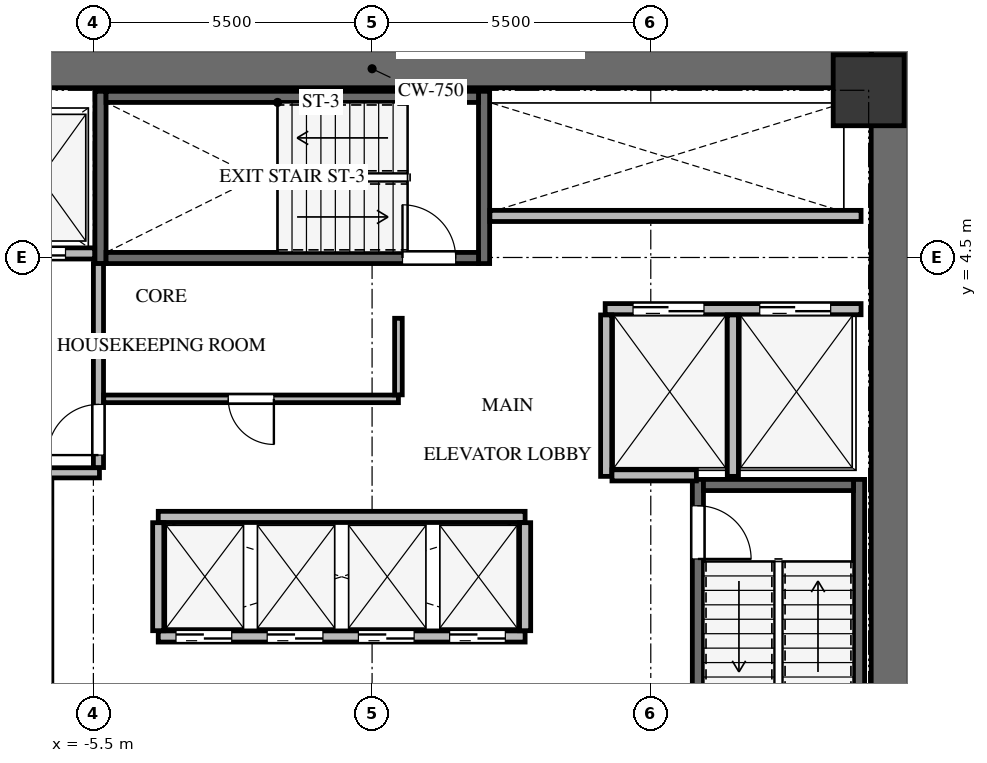
"""IFC4 building model, lengths in metres.
Left out: names, types, materials, properties, quantities, classifications, styles, units other than length and angle.
Written with IfcOpenShell. Run it as: python <this file> out.ifc"""

import sys

from ifc_helpers import new_model, si_unit, direction, frame, frame_2d, origin, origin_2d, place, context, subcontext, project, spatial, rectangle, extrude, source, transform, mapped, element, fill, save


model = new_model("IFC4")
c1 = context("Model", 3, precision=1e-05, world=origin(), true_north=direction((0.0, 1.0)))
c2 = subcontext(c1, "Body", "Model", "MODEL_VIEW")
j1 = project(units=[si_unit("LENGTHUNIT", "METRE"), si_unit("PLANEANGLEUNIT", "RADIAN")], contexts=[c1])
p1 = place(None, origin())
s1 = spatial("IfcSite", under=j1, at=p1, CompositionType="ELEMENT")
p2 = place(p1, origin())
s2 = spatial("IfcBuilding", under=s1, at=p2, CompositionType="ELEMENT")
p3 = place(p2, frame((0.0, 0.0, 114.0)))
s3 = spatial("IfcBuildingStorey", under=s2, at=p3, CompositionType="ELEMENT", Elevation=114.0)
p4 = place(p3, frame((10.225, -8.6, 0.0), z_axis=(0.0, 0.0, 1.0), x_axis=(0.0, 1.0, 0.0)))
e1 = element("IfcWall", 1, at=p4, inside=s3, PredefinedType="SHEAR", context=c2, shape_type="SweptSolid", body=[
    extrude(rectangle(XDim=17.2, YDim=0.75, at=frame_2d((8.6, 0.0))), origin(), (0.0, 0.0, 1.0), 3.3),
])
p5 = place(p3, frame((-9.85, 8.225, 0.0), z_axis=(0.0, 0.0, 1.0), x_axis=(1.0, 0.0, 0.0)))
e2 = element("IfcWall", 2, at=p5, inside=s3, PredefinedType="SHEAR", context=c2, shape_type="SweptSolid", body=[
    extrude(rectangle(XDim=19.7, YDim=0.75, at=frame_2d((9.85, 0.0))), origin(), (0.0, 0.0, 1.0), 3.3),
])
p6 = place(p3, frame((-6.43, -7.77, -0.24), z_axis=(0.0, 0.0, 1.0), x_axis=(0.0, 1.0, 0.0)))
e3 = element("IfcWall", 3, at=p6, inside=s3, PredefinedType="SHEAR", context=c2, shape_type="SweptSolid", body=[
    extrude(rectangle(XDim=7.89, YDim=0.22, at=frame_2d((3.945, 0.0))), origin(), (0.0, 0.0, 1.0), 3.3),
])
p7 = place(p6, frame((6.32, 0.0, 0.0)))
e4 = element("IfcOpeningElement", 4, at=p7, cuts=e3, PredefinedType="OPENING", context=c2, shape_type="SweptSolid", body=[
    extrude(rectangle(XDim=1.05, YDim=2.15, at=frame_2d((0.525, 1.075))), frame((0.0, 0.12, 0.0), z_axis=(0.0, -1.0, 0.0), x_axis=(1.0, 0.0, 0.0)), (0.0, 0.0, 1.0), 0.24),
])
p8 = place(p3, frame((9.61, -7.77, -0.24), z_axis=(0.0, 0.0, 1.0), x_axis=(0.0, 1.0, 0.0)))
e5 = element("IfcWall", 5, at=p8, inside=s3, PredefinedType="SHEAR", context=c2, shape_type="SweptSolid", body=[
    extrude(rectangle(XDim=7.89, YDim=0.22, at=frame_2d((3.945, 0.0))), origin(), (0.0, 0.0, 1.0), 3.3),
])
p9 = place(p3, frame((6.43, 0.12, -0.24), z_axis=(0.0, 0.0, 1.0), x_axis=(0.0, -1.0, 0.0)))
e6 = element("IfcWall", 6, at=p9, inside=s3, PredefinedType="SHEAR", context=c2, shape_type="SweptSolid", body=[
    extrude(rectangle(XDim=7.89, YDim=0.22, at=frame_2d((3.945, 0.0))), origin(), (0.0, 0.0, 1.0), 3.3),
])
p10 = place(p9, frame((0.52, 0.0, 0.0)))
e7 = element("IfcOpeningElement", 7, at=p10, cuts=e6, PredefinedType="OPENING", context=c2, shape_type="SweptSolid", body=[
    extrude(rectangle(XDim=1.05, YDim=2.15, at=frame_2d((0.525, 1.075))), frame((0.0, 0.12, 0.0), z_axis=(0.0, -1.0, 0.0), x_axis=(1.0, 0.0, 0.0)), (0.0, 0.0, 1.0), 0.24),
])
p11 = place(p3, frame((9.5, 0.01, -0.24), z_axis=(0.0, 0.0, 1.0), x_axis=(-1.0, 0.0, 0.0)))
e8 = element("IfcWall", 8, at=p11, inside=s3, PredefinedType="SHEAR", context=c2, shape_type="SweptSolid", body=[
    extrude(rectangle(XDim=2.96, YDim=0.22, at=frame_2d((1.48, 0.0))), origin(), (0.0, 0.0, 1.0), 3.3),
])
for number, where, z_axis, x_axis in (
    (9, (2.21, 4.38, -0.24), (0.0, 0.0, 1.0), (0.0, 1.0, 0.0)),
    (10, (-5.36, 7.78, -0.24), (0.0, 0.0, 1.0), (0.0, -1.0, 0.0)),
):
    element("IfcWall", number, at=place(p3, frame(where, z_axis=z_axis, x_axis=x_axis)), inside=s3, PredefinedType="SHEAR", context=c2, shape_type="SweptSolid", body=[
        extrude(rectangle(XDim=3.4, YDim=0.22, at=frame_2d((1.7, 0.0))), origin(), (0.0, 0.0, 1.0), 3.3),
    ])
p12 = place(p3, frame((-5.25, 4.49, -0.24), z_axis=(0.0, 0.0, 1.0), x_axis=(1.0, 0.0, 0.0)))
e11 = element("IfcWall", 11, at=p12, inside=s3, PredefinedType="SHEAR", context=c2, shape_type="SweptSolid", body=[
    extrude(rectangle(XDim=7.35, YDim=0.22, at=frame_2d((3.675, 0.0))), origin(), (0.0, 0.0, 1.0), 3.3),
])
p13 = place(p12, frame((5.85, 0.0, 0.0)))
e12 = element("IfcOpeningElement", 12, at=p13, cuts=e11, PredefinedType="OPENING", context=c2, shape_type="SweptSolid", body=[
    extrude(rectangle(XDim=1.05, YDim=2.15, at=frame_2d((0.525, 1.075))), frame((0.0, 0.12, 0.0), z_axis=(0.0, -1.0, 0.0), x_axis=(1.0, 0.0, 0.0)), (0.0, 0.0, 1.0), 0.24),
])
p14 = place(p3, frame((2.1, 7.67, -0.24), z_axis=(0.0, 0.0, 1.0), x_axis=(-1.0, 0.0, 0.0)))
e13 = element("IfcWall", 13, at=p14, inside=s3, PredefinedType="SHEAR", context=c2, shape_type="SweptSolid", body=[
    extrude(rectangle(XDim=7.35, YDim=0.22, at=frame_2d((3.675, 0.0))), origin(), (0.0, 0.0, 1.0), 3.3),
])
m1 = source(origin(), c2, "Body", "SweptSolid", [
    extrude(rectangle(XDim=1.4, YDim=1.4, at=origin_2d()), origin(), (0.0, 0.0, 1.0), 3.3),
])
p15 = place(p3, frame((9.8, 7.8, -0.24), z_axis=(0.0, 0.0, 1.0), x_axis=(1.0, 0.0, 0.0)))
e14 = element("IfcColumn", 14, at=p15, inside=s3, PredefinedType="COLUMN", context=c2, shape_type="MappedRepresentation", body=[
    mapped(m1, transform((0.0, 0.0, 0.0), x_axis=(1.0, 0.0, 0.0), y_axis=(0.0, 1.0, 0.0), z_axis=(0.0, 0.0, 1.0), scale=1.0)),
])
p16 = place(p3, frame((-9.65, 4.58, 0.0), z_axis=(0.0, 0.0, 1.0), x_axis=(1.0, 0.0, 0.0)))
e15 = element("IfcWall", 15, at=p16, inside=s3, PredefinedType="SOLIDWALL", context=c2, shape_type="SweptSolid", body=[
    extrude(rectangle(XDim=4.175, YDim=0.22, at=frame_2d((2.087, 0.0))), origin(), (0.0, 0.0, 1.0), 3.045),
])
p17 = place(p16, frame((0.4, 0.0, 0.0)))
e16 = element("IfcOpeningElement", 16, at=p17, cuts=e15, PredefinedType="OPENING", context=c2, shape_type="SweptSolid", body=[
    extrude(rectangle(XDim=1.2, YDim=2.15, at=frame_2d((0.6, 1.075))), frame((0.0, 0.12, 0.0), z_axis=(0.0, -1.0, 0.0), x_axis=(1.0, 0.0, 0.0)), (0.0, 0.0, 1.0), 0.24),
])
p18 = place(p16, frame((2.4, 0.0, 0.0)))
e17 = element("IfcOpeningElement", 17, at=p18, cuts=e15, PredefinedType="OPENING", context=c2, shape_type="SweptSolid", body=[
    extrude(rectangle(XDim=1.2, YDim=2.15, at=frame_2d((0.6, 1.075))), frame((0.0, 0.12, 0.0), z_axis=(0.0, -1.0, 0.0), x_axis=(1.0, 0.0, 0.0)), (0.0, 0.0, 1.0), 0.24),
])
p19 = place(p3, frame((-9.65, 0.25, 0.0), z_axis=(0.0, 0.0, 1.0), x_axis=(1.0, 0.0, 0.0)))
e18 = element("IfcWall", 18, at=p19, inside=s3, PredefinedType="SOLIDWALL", context=c2, shape_type="SweptSolid", body=[
    extrude(rectangle(XDim=4.27, YDim=0.2, at=frame_2d((2.135, 0.0))), origin(), (0.0, 0.0, 1.0), 3.045),
])
p20 = place(p3, frame((-5.4, 0.354, 0.0), z_axis=(0.0, 0.0, 1.0), x_axis=(0.0, 1.0, 0.0)))
e19 = element("IfcWall", 19, at=p20, inside=s3, PredefinedType="SOLIDWALL", context=c2, shape_type="SweptSolid", body=[
    extrude(rectangle(XDim=4.026, YDim=0.2, at=frame_2d((2.013, 0.0))), origin(), (0.0, 0.0, 1.0), 3.045),
])
p21 = place(p20, frame((0.246, 0.0, 0.0)))
e20 = element("IfcOpeningElement", 20, at=p21, cuts=e19, PredefinedType="OPENING", context=c2, shape_type="SweptSolid", body=[
    extrude(rectangle(XDim=1.0, YDim=2.15, at=frame_2d((0.5, 1.075))), frame((0.0, 0.11, 0.0), z_axis=(0.0, -1.0, 0.0), x_axis=(1.0, 0.0, 0.0)), (0.0, 0.0, 1.0), 0.22),
])
p22 = place(p3, frame((4.6, 3.48, 0.0), z_axis=(0.0, 0.0, 1.0), x_axis=(1.0, 0.0, 0.0)))
e21 = element("IfcWall", 21, at=p22, inside=s3, PredefinedType="SOLIDWALL", context=c2, shape_type="SweptSolid", body=[
    extrude(rectangle(XDim=5.05, YDim=0.22, at=frame_2d((2.525, 0.0))), origin(), (0.0, 0.0, 1.0), 3.045),
])
p23 = place(p22, frame((0.55, 0.0, 0.0)))
e22 = element("IfcOpeningElement", 22, at=p23, cuts=e21, PredefinedType="OPENING", context=c2, shape_type="SweptSolid", body=[
    extrude(rectangle(XDim=1.4, YDim=2.15, at=frame_2d((0.7, 1.075))), frame((0.0, 0.12, 0.0), z_axis=(0.0, -1.0, 0.0), x_axis=(1.0, 0.0, 0.0)), (0.0, 0.0, 1.0), 0.24),
])
p24 = place(p22, frame((3.05, 0.0, 0.0)))
e23 = element("IfcOpeningElement", 23, at=p24, cuts=e21, PredefinedType="OPENING", context=c2, shape_type="SweptSolid", body=[
    extrude(rectangle(XDim=1.4, YDim=2.15, at=frame_2d((0.7, 1.075))), frame((0.0, 0.12, 0.0), z_axis=(0.0, -1.0, 0.0), x_axis=(1.0, 0.0, 0.0)), (0.0, 0.0, 1.0), 0.24),
])
for number, where, z_axis, x_axis in (
    (24, (4.62, 0.18, 0.0), (0.0, 0.0, 1.0), (0.0, 1.0, 0.0)),
    (25, (7.12, 0.18, 0.0), (0.0, 0.0, 1.0), (0.0, 1.0, 0.0)),
):
    element("IfcWall", number, at=place(p3, frame(where, z_axis=z_axis, x_axis=x_axis)), inside=s3, PredefinedType="SOLIDWALL", context=c2, shape_type="SweptSolid", body=[
        extrude(rectangle(XDim=3.186, YDim=0.22, at=frame_2d((1.593, 0.0))), origin(), (0.0, 0.0, 1.0), 3.045),
    ])
p25 = place(p3, frame((4.734, 0.2, 0.0), z_axis=(0.0, 0.0, 1.0), x_axis=(1.0, 0.0, 0.0)))
e26 = element("IfcWall", 26, at=p25, inside=s3, PredefinedType="SOLIDWALL", context=c2, shape_type="SweptSolid", body=[
    extrude(rectangle(XDim=1.666, YDim=0.22, at=frame_2d((0.833, 0.0))), origin(), (0.0, 0.0, 1.0), 3.045),
])
p26 = place(p3, frame((-4.22, -2.98, 0.0), z_axis=(0.0, 0.0, 1.0), x_axis=(1.0, 0.0, 0.0)))
e27 = element("IfcWall", 27, at=p26, inside=s3, PredefinedType="SOLIDWALL", context=c2, shape_type="SweptSolid", body=[
    extrude(rectangle(XDim=7.24, YDim=0.22, at=frame_2d((3.62, 0.0))), origin(), (0.0, 0.0, 1.0), 3.045),
])
p27 = place(p26, frame((0.35, 0.0, 0.0)))
e28 = element("IfcOpeningElement", 28, at=p27, cuts=e27, PredefinedType="OPENING", context=c2, shape_type="SweptSolid", body=[
    extrude(rectangle(XDim=1.1, YDim=2.15, at=frame_2d((0.55, 1.075))), frame((0.0, 0.12, 0.0), z_axis=(0.0, -1.0, 0.0), x_axis=(1.0, 0.0, 0.0)), (0.0, 0.0, 1.0), 0.24),
])
p28 = place(p26, frame((2.15, 0.0, 0.0)))
e29 = element("IfcOpeningElement", 29, at=p28, cuts=e27, PredefinedType="OPENING", context=c2, shape_type="SweptSolid", body=[
    extrude(rectangle(XDim=1.1, YDim=2.15, at=frame_2d((0.55, 1.075))), frame((0.0, 0.12, 0.0), z_axis=(0.0, -1.0, 0.0), x_axis=(1.0, 0.0, 0.0)), (0.0, 0.0, 1.0), 0.24),
])
p29 = place(p26, frame((3.95, 0.0, 0.0)))
e30 = element("IfcOpeningElement", 30, at=p29, cuts=e27, PredefinedType="OPENING", context=c2, shape_type="SweptSolid", body=[
    extrude(rectangle(XDim=1.1, YDim=2.15, at=frame_2d((0.55, 1.075))), frame((0.0, 0.12, 0.0), z_axis=(0.0, -1.0, 0.0), x_axis=(1.0, 0.0, 0.0)), (0.0, 0.0, 1.0), 0.24),
])
p30 = place(p26, frame((5.75, 0.0, 0.0)))
e31 = element("IfcOpeningElement", 31, at=p30, cuts=e27, PredefinedType="OPENING", context=c2, shape_type="SweptSolid", body=[
    extrude(rectangle(XDim=1.1, YDim=2.15, at=frame_2d((0.55, 1.075))), frame((0.0, 0.12, 0.0), z_axis=(0.0, -1.0, 0.0), x_axis=(1.0, 0.0, 0.0)), (0.0, 0.0, 1.0), 0.24),
])
p31 = place(p3, frame((-4.22, -0.62, 0.0), z_axis=(0.0, 0.0, 1.0), x_axis=(1.0, 0.0, 0.0)))
e32 = element("IfcWall", 32, at=p31, inside=s3, PredefinedType="SOLIDWALL", context=c2, shape_type="SweptSolid", body=[
    extrude(rectangle(XDim=7.24, YDim=0.22, at=frame_2d((3.62, 0.0))), origin(), (0.0, 0.0, 1.0), 3.045),
])
for number, where, z_axis, x_axis in (
    (33, (-4.22, -2.866, 0.0), (0.0, 0.0, 1.0), (0.0, 1.0, 0.0)),
    (34, (3.02, -2.866, 0.0), (0.0, 0.0, 1.0), (0.0, 1.0, 0.0)),
):
    element("IfcWall", number, at=place(p3, frame(where, z_axis=z_axis, x_axis=x_axis)), inside=s3, PredefinedType="SOLIDWALL", context=c2, shape_type="SweptSolid", body=[
        extrude(rectangle(XDim=2.132, YDim=0.22, at=frame_2d((1.066, 0.0))), origin(), (0.0, 0.0, 1.0), 3.045),
    ])
p32 = place(p3, frame((2.325, 5.32, 0.0), z_axis=(0.0, 0.0, 1.0), x_axis=(1.0, 0.0, 0.0)))
e35 = element("IfcWall", 35, at=p32, inside=s3, PredefinedType="SOLIDWALL", context=c2, shape_type="SweptSolid", body=[
    extrude(rectangle(XDim=7.325, YDim=0.22, at=frame_2d((3.663, 0.0))), origin(), (0.0, 0.0, 1.0), 3.045),
])
p33 = place(p3, frame((0.52, 1.71, 0.0), z_axis=(0.0, 0.0, 1.0), x_axis=(-1.0, 0.0, 0.0)))
e36 = element("IfcWall", 36, at=p33, inside=s3, PredefinedType="PARTITIONING", context=c2, shape_type="SweptSolid", body=[
    extrude(rectangle(XDim=5.816, YDim=0.15, at=frame_2d((2.908, 0.0))), origin(), (0.0, 0.0, 1.0), 3.045),
])
p34 = place(p33, frame((2.458, 0.0, 0.0)))
e37 = element("IfcOpeningElement", 37, at=p34, cuts=e36, PredefinedType="OPENING", context=c2, shape_type="SweptSolid", body=[
    extrude(rectangle(XDim=0.9, YDim=2.05, at=frame_2d((0.45, 1.025))), frame((0.0, 0.085, 0.0), z_axis=(0.0, -1.0, 0.0), x_axis=(1.0, 0.0, 0.0)), (0.0, 0.0, 1.0), 0.17),
])
p35 = place(p3, frame((0.52, 3.3, 0.0), z_axis=(0.0, 0.0, 1.0), x_axis=(0.0, -1.0, 0.0)))
e38 = element("IfcWall", 38, at=p35, inside=s3, PredefinedType="PARTITIONING", context=c2, shape_type="SweptSolid", body=[
    extrude(rectangle(XDim=1.511, YDim=0.15, at=frame_2d((0.755, 0.0))), origin(), (0.0, 0.0, 1.0), 3.045),
])
m2 = source(origin(), c2, "Body", "SweptSolid", [
    extrude(rectangle(XDim=1.05, YDim=2.15, at=frame_2d((0.525, 1.075))), frame((0.0, 0.025, 0.0), z_axis=(0.0, -1.0, 0.0), x_axis=(1.0, 0.0, 0.0)), (0.0, 0.0, 1.0), 0.05),
])
p36 = place(p10, origin())
e39 = element("IfcDoor", 39, at=p36, inside=s3, OperationType="SINGLE_SWING_RIGHT", PredefinedType="DOOR", context=c2, shape_type="MappedRepresentation", body=[
    mapped(m2, transform((0.0, 0.0, 0.0), x_axis=(1.0, 0.0, 0.0), y_axis=(0.0, 1.0, 0.0), z_axis=(0.0, 0.0, 1.0), scale=1.0)),
])
fill(e7, e39)
m3 = source(origin(), c2, "Body", "SweptSolid", [
    extrude(rectangle(XDim=1.05, YDim=2.15, at=frame_2d((0.525, 1.075))), frame((0.0, 0.025, 0.0), z_axis=(0.0, -1.0, 0.0), x_axis=(1.0, 0.0, 0.0)), (0.0, 0.0, 1.0), 0.05),
])
p37 = place(p13, origin())
e40 = element("IfcDoor", 40, at=p37, inside=s3, OperationType="SINGLE_SWING_LEFT", PredefinedType="DOOR", context=c2, shape_type="MappedRepresentation", body=[
    mapped(m3, transform((0.0, 0.0, 0.0), x_axis=(1.0, 0.0, 0.0), y_axis=(0.0, 1.0, 0.0), z_axis=(0.0, 0.0, 1.0), scale=1.0)),
])
fill(e12, e40)
m4 = source(origin(), c2, "Body", "SweptSolid", [
    extrude(rectangle(XDim=1.2, YDim=2.15, at=frame_2d((0.6, 1.075))), frame((0.0, 0.025, 0.0), z_axis=(0.0, -1.0, 0.0), x_axis=(1.0, 0.0, 0.0)), (0.0, 0.0, 1.0), 0.05),
])
p38 = place(p18, origin())
e41 = element("IfcDoor", 41, at=p38, inside=s3, OperationType="DOUBLE_DOOR_SLIDING", PredefinedType="DOOR", context=c2, shape_type="MappedRepresentation", body=[
    mapped(m4, transform((0.0, 0.0, 0.0), x_axis=(1.0, 0.0, 0.0), y_axis=(0.0, 1.0, 0.0), z_axis=(0.0, 0.0, 1.0), scale=1.0)),
])
fill(e17, e41)
m5 = source(origin(), c2, "Body", "SweptSolid", [
    extrude(rectangle(XDim=1.0, YDim=2.15, at=frame_2d((0.5, 1.075))), frame((0.0, 0.025, 0.0), z_axis=(0.0, -1.0, 0.0), x_axis=(1.0, 0.0, 0.0)), (0.0, 0.0, 1.0), 0.05),
])
p39 = place(p21, origin())
e42 = element("IfcDoor", 42, at=p39, inside=s3, OperationType="SINGLE_SWING_LEFT", PredefinedType="DOOR", context=c2, shape_type="MappedRepresentation", body=[
    mapped(m5, transform((0.0, 0.0, 0.0), x_axis=(1.0, 0.0, 0.0), y_axis=(0.0, 1.0, 0.0), z_axis=(0.0, 0.0, 1.0), scale=1.0)),
])
fill(e20, e42)
m6 = source(origin(), c2, "Body", "SweptSolid", [
    extrude(rectangle(XDim=1.4, YDim=2.15, at=frame_2d((0.7, 1.075))), frame((0.0, 0.025, 0.0), z_axis=(0.0, -1.0, 0.0), x_axis=(1.0, 0.0, 0.0)), (0.0, 0.0, 1.0), 0.05),
])
p40 = place(p23, origin())
e43 = element("IfcDoor", 43, at=p40, inside=s3, OperationType="DOUBLE_DOOR_SLIDING", PredefinedType="DOOR", context=c2, shape_type="MappedRepresentation", body=[
    mapped(m6, transform((0.0, 0.0, 0.0), x_axis=(1.0, 0.0, 0.0), y_axis=(0.0, 1.0, 0.0), z_axis=(0.0, 0.0, 1.0), scale=1.0)),
])
fill(e22, e43)
p41 = place(p24, origin())
e44 = element("IfcDoor", 44, at=p41, inside=s3, OperationType="DOUBLE_DOOR_SLIDING", PredefinedType="DOOR", context=c2, shape_type="MappedRepresentation", body=[
    mapped(m6, transform((0.0, 0.0, 0.0), x_axis=(1.0, 0.0, 0.0), y_axis=(0.0, 1.0, 0.0), z_axis=(0.0, 0.0, 1.0), scale=1.0)),
])
fill(e23, e44)
m7 = source(origin(), c2, "Body", "SweptSolid", [
    extrude(rectangle(XDim=1.1, YDim=2.15, at=frame_2d((0.55, 1.075))), frame((0.0, 0.025, 0.0), z_axis=(0.0, -1.0, 0.0), x_axis=(1.0, 0.0, 0.0)), (0.0, 0.0, 1.0), 0.05),
])
p42 = place(p27, origin())
e45 = element("IfcDoor", 45, at=p42, inside=s3, OperationType="DOUBLE_DOOR_SLIDING", PredefinedType="DOOR", context=c2, shape_type="MappedRepresentation", body=[
    mapped(m7, transform((0.0, 0.0, 0.0), x_axis=(1.0, 0.0, 0.0), y_axis=(0.0, 1.0, 0.0), z_axis=(0.0, 0.0, 1.0), scale=1.0)),
])
fill(e28, e45)
p43 = place(p28, origin())
e46 = element("IfcDoor", 46, at=p43, inside=s3, OperationType="DOUBLE_DOOR_SLIDING", PredefinedType="DOOR", context=c2, shape_type="MappedRepresentation", body=[
    mapped(m7, transform((0.0, 0.0, 0.0), x_axis=(1.0, 0.0, 0.0), y_axis=(0.0, 1.0, 0.0), z_axis=(0.0, 0.0, 1.0), scale=1.0)),
])
fill(e29, e46)
p44 = place(p29, origin())
e47 = element("IfcDoor", 47, at=p44, inside=s3, OperationType="DOUBLE_DOOR_SLIDING", PredefinedType="DOOR", context=c2, shape_type="MappedRepresentation", body=[
    mapped(m7, transform((0.0, 0.0, 0.0), x_axis=(1.0, 0.0, 0.0), y_axis=(0.0, 1.0, 0.0), z_axis=(0.0, 0.0, 1.0), scale=1.0)),
])
fill(e30, e47)
p45 = place(p30, origin())
e48 = element("IfcDoor", 48, at=p45, inside=s3, OperationType="DOUBLE_DOOR_SLIDING", PredefinedType="DOOR", context=c2, shape_type="MappedRepresentation", body=[
    mapped(m7, transform((0.0, 0.0, 0.0), x_axis=(1.0, 0.0, 0.0), y_axis=(0.0, 1.0, 0.0), z_axis=(0.0, 0.0, 1.0), scale=1.0)),
])
fill(e31, e48)
m8 = source(origin(), c2, "Body", "SweptSolid", [
    extrude(rectangle(XDim=0.9, YDim=2.05, at=frame_2d((0.45, 1.025))), frame((0.0, 0.025, 0.0), z_axis=(0.0, -1.0, 0.0), x_axis=(1.0, 0.0, 0.0)), (0.0, 0.0, 1.0), 0.05),
])
p46 = place(p34, origin())
e49 = element("IfcDoor", 49, at=p46, inside=s3, OperationType="SINGLE_SWING_LEFT", PredefinedType="DOOR", context=c2, shape_type="MappedRepresentation", body=[
    mapped(m8, transform((0.0, 0.0, 0.0), x_axis=(1.0, 0.0, 0.0), y_axis=(0.0, 1.0, 0.0), z_axis=(0.0, 0.0, 1.0), scale=1.0)),
])
fill(e37, e49)
save(model, sys.argv[1])
